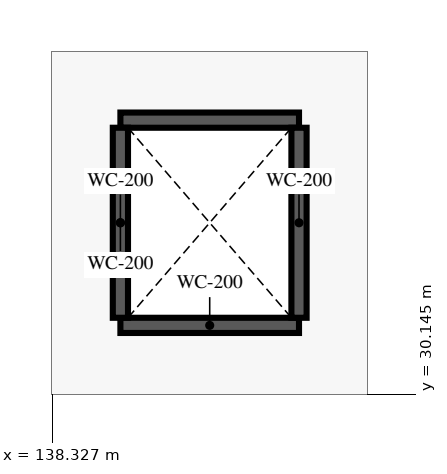
"""IFC4 building model, lengths in metres.
Left out: names, types, materials, properties, quantities, classifications, styles, units other than length and angle.
Written with IfcOpenShell. Run it as: python <this file> out.ifc"""

import sys

from ifc_helpers import new_model, si_unit, direction, frame, frame_2d, origin, place, context, subcontext, project, spatial, rectangle, extrude, element, save


model = new_model("IFC4")
c1 = context("Model", 3, precision=1e-05, world=origin(), true_north=direction((0.0, 1.0)))
c2 = subcontext(c1, "Body", "Model", "MODEL_VIEW")
j1 = project(units=[si_unit("LENGTHUNIT", "METRE"), si_unit("PLANEANGLEUNIT", "RADIAN")], contexts=[c1])
p1 = place(None, origin())
s1 = spatial("IfcSite", under=j1, at=p1, CompositionType="ELEMENT")
p2 = place(p1, origin())
s2 = spatial("IfcBuilding", under=s1, at=p2, CompositionType="ELEMENT")
p3 = place(p2, frame((0.0, 0.0, 25.65)))
s3 = spatial("IfcBuildingStorey", under=s2, at=p3, CompositionType="ELEMENT", Elevation=25.65)
for number, where, z_axis, x_axis in (
    (1, (139.225, 31.05, 0.0), (0.0, 0.0, 1.0), (1.0, 0.0, 0.0)),
    (2, (139.225, 33.75, 0.0), (0.0, 0.0, 1.0), (1.0, 0.0, 0.0)),
):
    element("IfcWall", number, at=place(p3, frame(where, z_axis=z_axis, x_axis=x_axis)), inside=s3, PredefinedType="SHEAR", context=c2, shape_type="SweptSolid", body=[
        extrude(rectangle(XDim=2.35, YDim=0.2, at=frame_2d((1.175, 0.0))), origin(), (0.0, 0.0, 1.0), 3.83),
    ])
for number, where, z_axis, x_axis in (
    (3, (139.225, 31.15, 0.0), (0.0, 0.0, 1.0), (0.0, 1.0, 0.0)),
    (4, (141.575, 31.15, 0.0), (0.0, 0.0, 1.0), (0.0, 1.0, 0.0)),
):
    element("IfcWall", number, at=place(p3, frame(where, z_axis=z_axis, x_axis=x_axis)), inside=s3, PredefinedType="SHEAR", context=c2, shape_type="SweptSolid", body=[
        extrude(rectangle(XDim=2.5, YDim=0.2, at=frame_2d((1.25, 0.0))), origin(), (0.0, 0.0, 1.0), 3.83),
    ])
save(model, sys.argv[1])
